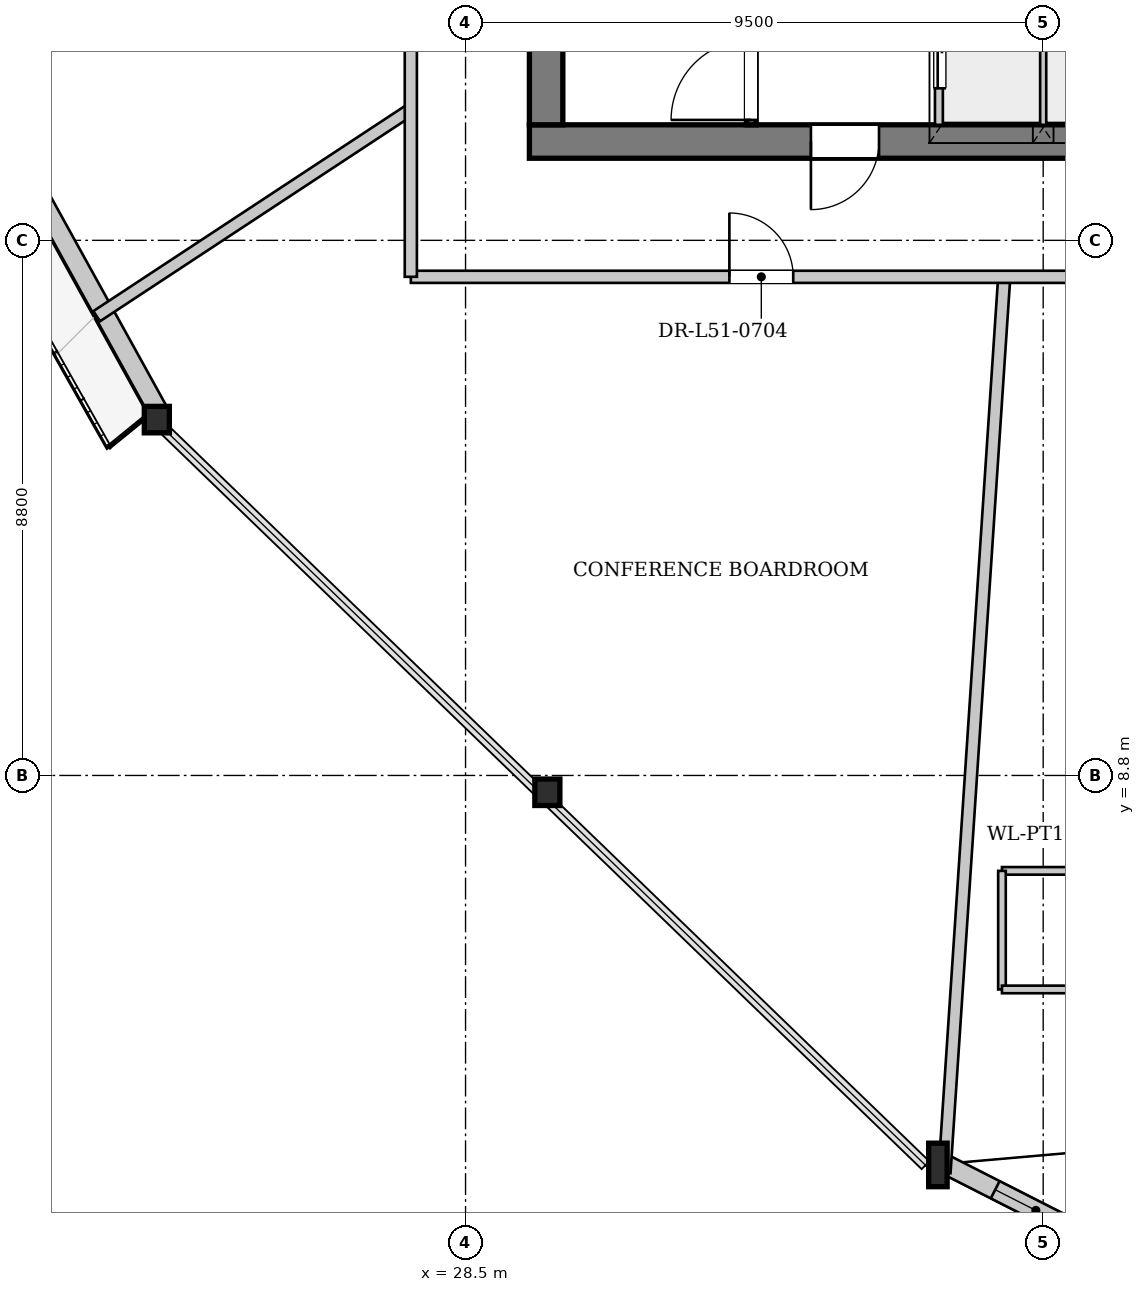
"""IFC4 building model, lengths in metres.
Left out: names, types, materials, properties, quantities, classifications, styles, units other than length and angle.
Written with IfcOpenShell. Run it as: python <this file> out.ifc"""

import sys

from ifc_helpers import new_model, si_unit, direction, frame, frame_2d, origin, origin_2d, place, context, subcontext, project, spatial, rectangle, i_section, extrude, source, transform, mapped, element, fill, save


model = new_model("IFC4")
c1 = context("Model", 3, precision=1e-05, world=origin(), true_north=direction((0.0, 1.0)))
c2 = subcontext(c1, "Body", "Model", "MODEL_VIEW")
j1 = project(units=[si_unit("LENGTHUNIT", "METRE"), si_unit("PLANEANGLEUNIT", "RADIAN")], contexts=[c1])
p1 = place(None, origin())
s1 = spatial("IfcSite", under=j1, at=p1, CompositionType="ELEMENT")
p2 = place(p1, origin())
s2 = spatial("IfcBuilding", under=s1, at=p2, CompositionType="ELEMENT")
p3 = place(p2, frame((0.0, 0.0, 192.75)))
s3 = spatial("IfcBuildingStorey", under=s2, at=p3, CompositionType="ELEMENT", Elevation=192.75)
m1 = source(origin(), c2, "Body", "SweptSolid", [
    extrude(i_section(OverallWidth=0.412, OverallDepth=0.435, WebThickness=0.031, FlangeThickness=0.05, at=origin_2d()), origin(), (0.0, 0.0, 1.0), 3.399),
])
p4 = place(p3, frame((23.292, 14.737, 0.0), z_axis=(0.076918881713, -0.050058319845, 0.99577992059), x_axis=(0.545455886295, 0.8381395326, 0.0)))
e1 = element("IfcColumn", 1, at=p4, inside=s3, PredefinedType="COLUMN", context=c2, shape_type="MappedRepresentation", body=[
    mapped(m1, transform((0.0, 0.0, 0.0), x_axis=(1.0, 0.0, 0.0), y_axis=(0.0, 1.0, 0.0), z_axis=(0.0, 0.0, 1.0), scale=1.0)),
])
m2 = source(origin(), c2, "Body", "SweptSolid", [
    extrude(i_section(OverallWidth=0.412, OverallDepth=0.435, WebThickness=0.031, FlangeThickness=0.05, at=origin_2d()), origin(), (0.0, 0.0, 1.0), 3.402),
])
p5 = place(p3, frame((29.678, 8.564, 0.0), z_axis=(0.098303525222, -0.023678951331, 0.994874727889), x_axis=(0.234178050748, 0.972193725832, 0.0)))
e2 = element("IfcColumn", 2, at=p5, inside=s3, PredefinedType="COLUMN", context=c2, shape_type="MappedRepresentation", body=[
    mapped(m2, transform((0.0, 0.0, 0.0), x_axis=(1.0, 0.0, 0.0), y_axis=(0.0, 1.0, 0.0), z_axis=(0.0, 0.0, 1.0), scale=1.0)),
])
m3 = source(origin(), c2, "Body", "SweptSolid", [
    extrude(i_section(OverallWidth=0.304, OverallDepth=0.716, WebThickness=0.021, FlangeThickness=0.04, at=origin_2d()), origin(), (0.0, 0.0, 1.0), 3.409),
])
p6 = place(p3, frame((36.064, 2.39, 0.0), z_axis=(0.119582447406, 0.002649431469, 0.992820738495), x_axis=(-0.022150252792, 0.999754653053, 0.0)))
e3 = element("IfcColumn", 3, at=p6, inside=s3, PredefinedType="COLUMN", context=c2, shape_type="MappedRepresentation", body=[
    mapped(m3, transform((0.0, 0.0, 0.0), x_axis=(1.0, 0.0, 0.0), y_axis=(0.0, 1.0, 0.0), z_axis=(0.0, 0.0, 1.0), scale=1.0)),
])
p7 = place(p3, frame((39.265, 0.943, 0.0), z_axis=(0.0, 0.0, 1.0), x_axis=(-0.891429905263, 0.453158607998, 0.0)))
e4 = element("IfcWall", 4, at=p7, inside=s3, PredefinedType="SOLIDWALL", context=c2, shape_type="SweptSolid", body=[
    extrude(rectangle(XDim=3.51, YDim=0.32, at=frame_2d((1.755, 0.0))), origin(), (0.0, 0.0, 1.0), 2.722),
])
p8 = place(p7, frame((0.805, 0.0, 0.302)))
e5 = element("IfcOpeningElement", 5, at=p8, cuts=e4, PredefinedType="OPENING", context=c2, shape_type="SweptSolid", body=[
    extrude(rectangle(XDim=1.5, YDim=2.3, at=frame_2d((0.75, 1.15))), frame((0.0, 0.17, 0.0), z_axis=(0.0, -1.0, 0.0), x_axis=(1.0, 0.0, 0.0)), (0.0, 0.0, 1.0), 0.34),
])
p9 = place(p3, frame((23.432, 14.814, 0.0), z_axis=(0.0, 0.0, 1.0), x_axis=(-0.483768949269, 0.87519575166, 0.0)))
e6 = element("IfcWall", 6, at=p9, inside=s3, PredefinedType="SOLIDWALL", context=c2, shape_type="SweptSolid", body=[
    extrude(rectangle(XDim=17.764, YDim=0.32, at=frame_2d((8.882, 0.0))), origin(), (0.0, 0.0, 1.0), 2.722),
])
p10 = place(p9, frame((4.935, 0.0, 0.0)))
e7 = element("IfcOpeningElement", 7, at=p10, cuts=e6, PredefinedType="OPENING", context=c2, shape_type="SweptSolid", body=[
    extrude(rectangle(XDim=1.5, YDim=2.3, at=frame_2d((0.75, 1.15))), frame((0.0, 0.17, 0.0), z_axis=(0.0, -1.0, 0.0), x_axis=(1.0, 0.0, 0.0)), (0.0, 0.0, 1.0), 0.34),
])
p11 = place(p9, frame((11.845, 0.0, 0.252)))
e8 = element("IfcOpeningElement", 8, at=p11, cuts=e6, PredefinedType="OPENING", context=c2, shape_type="SweptSolid", body=[
    extrude(rectangle(XDim=2.6, YDim=2.35, at=frame_2d((1.3, 1.175))), frame((0.0, 0.17, 0.0), z_axis=(0.0, -1.0, 0.0), x_axis=(1.0, 0.0, 0.0)), (0.0, 0.0, 1.0), 0.34),
])
p12 = place(p3, frame((46.45, 19.225, 0.0), z_axis=(0.0, 0.0, 1.0), x_axis=(-1.0, 0.0, 0.0)))
e9 = element("IfcWall", 9, at=p12, inside=s3, PredefinedType="SHEAR", context=c2, shape_type="SweptSolid", body=[
    extrude(rectangle(XDim=16.9, YDim=0.55, at=frame_2d((8.45, 0.0))), origin(), (0.0, 0.0, 1.0), 3.33),
])
p13 = place(p12, frame((4.65, 0.0, 0.0)))
e10 = element("IfcOpeningElement", 10, at=p13, cuts=e9, PredefinedType="OPENING", context=c2, shape_type="SweptSolid", body=[
    extrude(rectangle(XDim=1.12, YDim=2.25, at=frame_2d((0.56, 1.125))), frame((0.0, 0.285, 0.0), z_axis=(0.0, -1.0, 0.0), x_axis=(1.0, 0.0, 0.0)), (0.0, 0.0, 1.0), 0.57),
])
p14 = place(p12, frame((11.15, 0.0, 0.0)))
e11 = element("IfcOpeningElement", 11, at=p14, cuts=e9, PredefinedType="OPENING", context=c2, shape_type="SweptSolid", body=[
    extrude(rectangle(XDim=1.12, YDim=2.25, at=frame_2d((0.56, 1.125))), frame((0.0, 0.285, 0.0), z_axis=(0.0, -1.0, 0.0), x_axis=(1.0, 0.0, 0.0)), (0.0, 0.0, 1.0), 0.57),
])
p15 = place(p3, frame((29.825, 19.5, 0.0), z_axis=(0.0, 0.0, 1.0), x_axis=(0.0, 1.0, 0.0)))
e12 = element("IfcWall", 12, at=p15, inside=s3, PredefinedType="SHEAR", context=c2, shape_type="SweptSolid", body=[
    extrude(rectangle(XDim=14.2, YDim=0.55, at=frame_2d((7.1, 0.0))), origin(), (0.0, 0.0, 1.0), 3.33),
])
p16 = place(p15, frame((7.42, 0.0, 0.0)))
e13 = element("IfcOpeningElement", 13, at=p16, cuts=e12, PredefinedType="OPENING", context=c2, shape_type="SweptSolid", body=[
    extrude(rectangle(XDim=1.6, YDim=2.2, at=frame_2d((0.8, 1.1))), frame((0.0, 0.285, 0.0), z_axis=(0.0, -1.0, 0.0), x_axis=(1.0, 0.0, 0.0)), (0.0, 0.0, 1.0), 0.57),
])
p17 = place(p3, frame((33.2, 19.5, 0.0), z_axis=(0.0, 0.0, 1.0), x_axis=(0.0, 1.0, 0.0)))
e14 = element("IfcWall", 14, at=p17, inside=s3, PredefinedType="PARTITIONING", context=c2, shape_type="SweptSolid", body=[
    extrude(rectangle(XDim=7.46, YDim=0.16, at=frame_2d((3.73, 0.0))), origin(), (0.0, 0.0, 1.0), 3.33),
])
p18 = place(p17, frame((0.08, 0.0, 0.0)))
e15 = element("IfcOpeningElement", 15, at=p18, cuts=e14, PredefinedType="OPENING", context=c2, shape_type="SweptSolid", body=[
    extrude(rectangle(XDim=1.32, YDim=2.2, at=frame_2d((0.66, 1.1))), frame((0.0, 0.09, 0.0), z_axis=(0.0, -1.0, 0.0), x_axis=(1.0, 0.0, 0.0)), (0.0, 0.0, 1.0), 0.18),
])
p19 = place(p3, frame((36.3, 19.5, 0.0), z_axis=(0.0, 0.0, 1.0), x_axis=(0.0, 1.0, 0.0)))
e16 = element("IfcWall", 16, at=p19, inside=s3, PredefinedType="PARTITIONING", context=c2, shape_type="SweptSolid", body=[
    extrude(rectangle(XDim=4.78, YDim=0.16, at=frame_2d((2.39, 0.0))), origin(), (0.0, 0.0, 1.0), 3.33),
])
p20 = place(p19, frame((0.6, 0.0, 0.0)))
e17 = element("IfcOpeningElement", 17, at=p20, cuts=e16, PredefinedType="OPENING", context=c2, shape_type="SweptSolid", body=[
    extrude(rectangle(XDim=1.2, YDim=2.2, at=frame_2d((0.6, 1.1))), frame((0.0, 0.09, 0.0), z_axis=(0.0, -1.0, 0.0), x_axis=(1.0, 0.0, 0.0)), (0.0, 0.0, 1.0), 0.18),
])
p21 = place(p19, frame((2.65, 0.0, 0.0)))
e18 = element("IfcOpeningElement", 18, at=p21, cuts=e16, PredefinedType="OPENING", context=c2, shape_type="SweptSolid", body=[
    extrude(rectangle(XDim=0.95, YDim=2.1, at=frame_2d((0.475, 1.05))), frame((0.0, 0.09, 0.0), z_axis=(0.0, -1.0, 0.0), x_axis=(1.0, 0.0, 0.0)), (0.0, 0.0, 1.0), 0.18),
])
p22 = place(p3, frame((38.0, 19.5, 0.0), z_axis=(0.0, 0.0, 1.0), x_axis=(0.0, 1.0, 0.0)))
e19 = element("IfcWall", 19, at=p22, inside=s3, PredefinedType="PARTITIONING", context=c2, shape_type="SweptSolid", body=[
    extrude(rectangle(XDim=2.46, YDim=0.125, at=frame_2d((1.23, 0.0))), origin(), (0.0, 0.0, 1.0), 3.33),
])
p23 = place(p3, frame((27.6, 19.754, 0.0), z_axis=(0.0, 0.0, 1.0), x_axis=(-0.835254425116, -0.549863660668, 0.0)))
e20 = element("IfcWall", 20, at=p23, inside=s3, PredefinedType="PARTITIONING", context=c2, shape_type="SweptSolid", body=[
    extrude(rectangle(XDim=6.186, YDim=0.2, at=frame_2d((3.093, 0.0))), origin(), (0.0, 0.0, 1.0), 3.33),
])
p24 = place(p3, frame((37.359, 17.0, 0.0), z_axis=(0.0, 0.0, 1.0), x_axis=(-0.066576069222, -0.997781352305, 0.0)))
e21 = element("IfcWall", 21, at=p24, inside=s3, PredefinedType="PARTITIONING", context=c2, shape_type="SweptSolid", body=[
    extrude(rectangle(XDim=14.767, YDim=0.2, at=frame_2d((7.384, 0.0))), origin(), (0.0, 0.0, 1.0), 3.33),
])
p25 = place(p3, frame((39.722, 7.231, 0.0), z_axis=(0.0, 0.0, 1.0), x_axis=(-1.0, 0.0, 0.0)))
e22 = element("IfcWall", 22, at=p25, inside=s3, PredefinedType="PARTITIONING", context=c2, shape_type="SweptSolid", body=[
    extrude(rectangle(XDim=2.4, YDim=0.125, at=frame_2d((1.2, 0.0))), origin(), (0.0, 0.0, 1.0), 3.33),
])
p26 = place(p3, frame((37.322, 7.231, 0.0), z_axis=(0.0, 0.0, 1.0), x_axis=(0.0, -1.0, 0.0)))
e23 = element("IfcWall", 23, at=p26, inside=s3, PredefinedType="PARTITIONING", context=c2, shape_type="SweptSolid", body=[
    extrude(rectangle(XDim=1.95, YDim=0.125, at=frame_2d((0.975, 0.0))), origin(), (0.0, 0.0, 1.0), 3.33),
])
p27 = place(p3, frame((37.322, 5.281, 0.0), z_axis=(0.0, 0.0, 1.0), x_axis=(1.0, 0.0, 0.0)))
e24 = element("IfcWall", 24, at=p27, inside=s3, PredefinedType="PARTITIONING", context=c2, shape_type="SweptSolid", body=[
    extrude(rectangle(XDim=2.4, YDim=0.125, at=frame_2d((1.2, 0.0))), origin(), (0.0, 0.0, 1.0), 3.33),
])
p28 = place(p3, frame((27.6, 17.0, 0.0), z_axis=(0.0, 0.0, 1.0), x_axis=(1.0, 0.0, 0.0)))
e25 = element("IfcWall", 25, at=p28, inside=s3, PredefinedType="PARTITIONING", context=c2, shape_type="SweptSolid", body=[
    extrude(rectangle(XDim=20.8, YDim=0.2, at=frame_2d((10.4, 0.0))), origin(), (0.0, 0.0, 1.0), 3.33),
])
p29 = place(p28, frame((19.45, 0.0, 0.0)))
e26 = element("IfcOpeningElement", 26, at=p29, cuts=e25, PredefinedType="OPENING", context=c2, shape_type="SweptSolid", body=[
    extrude(rectangle(XDim=1.05, YDim=2.2, at=frame_2d((0.525, 1.1))), frame((0.0, 0.11, 0.0), z_axis=(0.0, -1.0, 0.0), x_axis=(1.0, 0.0, 0.0)), (0.0, 0.0, 1.0), 0.22),
])
p30 = place(p28, frame((5.239, 0.0, 0.0)))
e27 = element("IfcOpeningElement", 27, at=p30, cuts=e25, PredefinedType="OPENING", context=c2, shape_type="SweptSolid", body=[
    extrude(rectangle(XDim=1.05, YDim=2.2, at=frame_2d((0.525, 1.1))), frame((0.0, 0.11, 0.0), z_axis=(0.0, -1.0, 0.0), x_axis=(1.0, 0.0, 0.0)), (0.0, 0.0, 1.0), 0.22),
])
p31 = place(p28, frame((12.653, 0.0, 0.0)))
e28 = element("IfcOpeningElement", 28, at=p31, cuts=e25, PredefinedType="OPENING", context=c2, shape_type="SweptSolid", body=[
    extrude(rectangle(XDim=1.05, YDim=2.2, at=frame_2d((0.525, 1.1))), frame((0.0, 0.11, 0.0), z_axis=(0.0, -1.0, 0.0), x_axis=(1.0, 0.0, 0.0)), (0.0, 0.0, 1.0), 0.22),
])
p32 = place(p3, frame((27.6, 17.0, 0.0), z_axis=(0.0, 0.0, 1.0), x_axis=(0.0, 1.0, 0.0)))
e29 = element("IfcWall", 29, at=p32, inside=s3, PredefinedType="PARTITIONING", context=c2, shape_type="SweptSolid", body=[
    extrude(rectangle(XDim=19.2, YDim=0.2, at=frame_2d((9.6, 0.0))), origin(), (0.0, 0.0, 1.0), 3.33),
])
p33 = place(p32, frame((7.475, 0.0, 0.0)))
e30 = element("IfcOpeningElement", 30, at=p33, cuts=e29, PredefinedType="OPENING", context=c2, shape_type="SweptSolid", body=[
    extrude(rectangle(XDim=1.05, YDim=2.2, at=frame_2d((0.525, 1.1))), frame((0.0, 0.11, 0.0), z_axis=(0.0, -1.0, 0.0), x_axis=(1.0, 0.0, 0.0)), (0.0, 0.0, 1.0), 0.22),
])
m4 = source(origin(), c2, "Body", "SweptSolid", [
    extrude(rectangle(XDim=1.5, YDim=2.3, at=frame_2d((0.75, 1.15))), frame((0.0, 0.03, 0.0), z_axis=(0.0, -1.0, 0.0), x_axis=(1.0, 0.0, 0.0)), (0.0, 0.0, 1.0), 0.06),
])
p34 = place(p8, origin())
e31 = element("IfcWindow", 31, at=p34, inside=s3, PartitioningType="SINGLE_PANEL", PredefinedType="WINDOW", context=c2, shape_type="MappedRepresentation", body=[
    mapped(m4, transform((0.0, 0.0, 0.0), x_axis=(1.0, 0.0, 0.0), y_axis=(0.0, 1.0, 0.0), z_axis=(0.0, 0.0, 1.0), scale=1.0)),
])
fill(e5, e31)
m5 = source(origin(), c2, "Body", "SweptSolid", [
    extrude(rectangle(XDim=1.12, YDim=2.25, at=frame_2d((0.56, 1.125))), frame((0.0, 0.025, 0.0), z_axis=(0.0, -1.0, 0.0), x_axis=(1.0, 0.0, 0.0)), (0.0, 0.0, 1.0), 0.05),
])
p35 = place(p14, origin())
e32 = element("IfcDoor", 32, at=p35, inside=s3, OperationType="SINGLE_SWING_RIGHT", PredefinedType="DOOR", context=c2, shape_type="MappedRepresentation", body=[
    mapped(m5, transform((0.0, 0.0, 0.0), x_axis=(1.0, 0.0, 0.0), y_axis=(0.0, 1.0, 0.0), z_axis=(0.0, 0.0, 1.0), scale=1.0)),
])
fill(e11, e32)
m6 = source(origin(), c2, "Body", "SweptSolid", [
    extrude(rectangle(XDim=1.32, YDim=2.2, at=frame_2d((0.66, 1.1))), frame((0.0, 0.025, 0.0), z_axis=(0.0, -1.0, 0.0), x_axis=(1.0, 0.0, 0.0)), (0.0, 0.0, 1.0), 0.05),
])
p36 = place(p18, origin())
e33 = element("IfcDoor", 33, at=p36, inside=s3, OperationType="SINGLE_SWING_LEFT", PredefinedType="DOOR", context=c2, shape_type="MappedRepresentation", body=[
    mapped(m6, transform((0.0, 0.0, 0.0), x_axis=(1.0, 0.0, 0.0), y_axis=(0.0, 1.0, 0.0), z_axis=(0.0, 0.0, 1.0), scale=1.0)),
])
fill(e15, e33)
m7 = source(origin(), c2, "Body", "SweptSolid", [
    extrude(rectangle(XDim=1.2, YDim=2.2, at=frame_2d((0.6, 1.1))), frame((0.0, 0.025, 0.0), z_axis=(0.0, -1.0, 0.0), x_axis=(1.0, 0.0, 0.0)), (0.0, 0.0, 1.0), 0.05),
])
p37 = place(p20, origin())
e34 = element("IfcDoor", 34, at=p37, inside=s3, OperationType="DOUBLE_DOOR_SLIDING", PredefinedType="DOOR", context=c2, shape_type="MappedRepresentation", body=[
    mapped(m7, transform((0.0, 0.0, 0.0), x_axis=(1.0, 0.0, 0.0), y_axis=(0.0, 1.0, 0.0), z_axis=(0.0, 0.0, 1.0), scale=1.0)),
])
fill(e17, e34)
m8 = source(origin(), c2, "Body", "SweptSolid", [
    extrude(rectangle(XDim=1.05, YDim=2.2, at=frame_2d((0.525, 1.1))), frame((0.0, 0.025, 0.0), z_axis=(0.0, -1.0, 0.0), x_axis=(1.0, 0.0, 0.0)), (0.0, 0.0, 1.0), 0.05),
])
p38 = place(p30, origin())
e35 = element("IfcDoor", 35, at=p38, inside=s3, OperationType="SINGLE_SWING_LEFT", PredefinedType="DOOR", context=c2, shape_type="MappedRepresentation", body=[
    mapped(m8, transform((0.0, 0.0, 0.0), x_axis=(1.0, 0.0, 0.0), y_axis=(0.0, 1.0, 0.0), z_axis=(0.0, 0.0, 1.0), scale=1.0)),
])
fill(e27, e35)
save(model, sys.argv[1])
